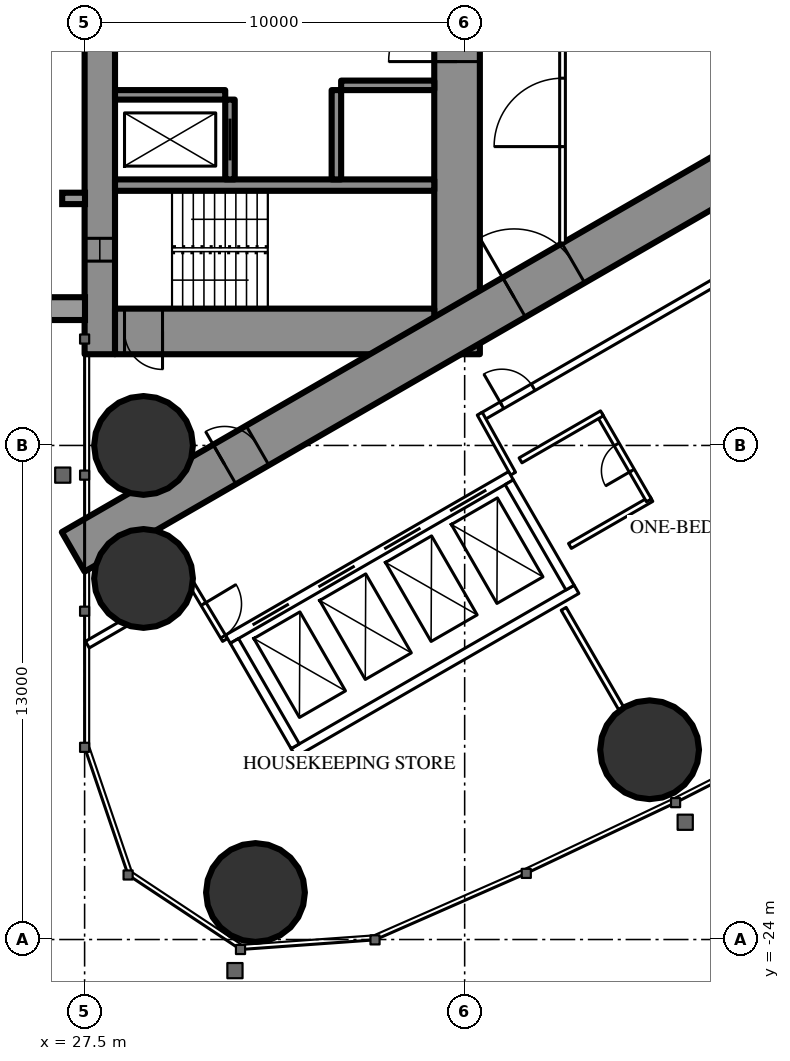
"""IFC4 building model, lengths in metres.
Left out: names, types, materials, properties, quantities, classifications, styles, units other than length and angle.
Written with IfcOpenShell. Run it as: python <this file> out.ifc"""

import sys

from ifc_helpers import new_model, si_unit, direction, frame, frame_2d, origin, origin_2d, place, context, subcontext, project, spatial, rectangle, hollow_circle, extrude, element, fill, save


model = new_model("IFC4")
c1 = context("Model", 3, precision=1e-05, world=origin(), true_north=direction((0.0, 1.0)))
c2 = subcontext(c1, "Body", "Model", "MODEL_VIEW")
j1 = project(units=[si_unit("LENGTHUNIT", "METRE"), si_unit("PLANEANGLEUNIT", "RADIAN")], contexts=[c1])
p1 = place(None, origin())
s1 = spatial("IfcSite", under=j1, at=p1, CompositionType="ELEMENT")
p2 = place(p1, origin())
s2 = spatial("IfcBuilding", under=s1, at=p2, CompositionType="ELEMENT")
p3 = place(p2, frame((0.0, 0.0, 139.6)))
s3 = spatial("IfcBuildingStorey", under=s2, at=p3, CompositionType="ELEMENT", Elevation=139.6)
for number, where, z_axis, x_axis in (
    (1, (31.996, -22.763, 0.0), (0.0, 0.0, 1.0), (1.0, 0.0, 0.0)),
    (2, (29.05, -11.0, 0.0), (0.0, 0.0, 1.0), (1.0, 0.0, 0.0)),
    (3, (29.05, -14.5, 0.0), (0.0, 0.0, 1.0), (1.0, 0.0, 0.0)),
    (4, (42.366, -19.007, 0.0), (0.0, 0.0, 1.0), (1.0, 0.0, 0.0)),
):
    element("IfcColumn", number, at=place(p3, frame(where, z_axis=z_axis, x_axis=x_axis)), inside=s3, PredefinedType="COLUMN", context=c2, shape_type="SweptSolid", body=[
        extrude(hollow_circle(Radius=1.3, WallThickness=0.1, at=origin_2d()), origin(), (0.0, 0.0, 1.0), 3.5),
    ])
p4 = place(p3, frame((27.9, -8.6, 0.0), z_axis=(0.0, 0.0, 1.0), x_axis=(0.0, 1.0, 0.0)))
e5 = element("IfcWall", 5, at=p4, inside=s3, PredefinedType="SHEAR", context=c2, shape_type="SweptSolid", body=[
    extrude(rectangle(XDim=17.2, YDim=0.8, at=frame_2d((8.6, 0.0))), origin(), (0.0, 0.0, 1.0), 3.5),
])
p5 = place(p4, frame((2.45, 0.0, 0.6)))
e6 = element("IfcOpeningElement", 6, at=p5, cuts=e5, PredefinedType="OPENING", context=c2, shape_type="SweptSolid", body=[
    extrude(rectangle(XDim=0.6, YDim=2.1, at=frame_2d((0.3, 1.05))), frame((0.0, 0.41, 0.0), z_axis=(0.0, -1.0, 0.0), x_axis=(1.0, 0.0, 0.0)), (0.0, 0.0, 1.0), 0.82),
])
p6 = place(p4, frame((14.15, 0.0, 0.6)))
e7 = element("IfcOpeningElement", 7, at=p6, cuts=e5, PredefinedType="OPENING", context=c2, shape_type="SweptSolid", body=[
    extrude(rectangle(XDim=0.6, YDim=2.1, at=frame_2d((0.3, 1.05))), frame((0.0, 0.41, 0.0), z_axis=(0.0, -1.0, 0.0), x_axis=(1.0, 0.0, 0.0)), (0.0, 0.0, 1.0), 0.82),
])
p7 = place(p3, frame((37.3, -8.6, 0.0), z_axis=(0.0, 0.0, 1.0), x_axis=(0.0, 1.0, 0.0)))
e8 = element("IfcWall", 8, at=p7, inside=s3, PredefinedType="SHEAR", context=c2, shape_type="SweptSolid", body=[
    extrude(rectangle(XDim=17.2, YDim=1.2, at=frame_2d((8.6, 0.0))), origin(), (0.0, 0.0, 1.0), 3.5),
])
p8 = place(p7, frame((7.7, 0.0, 0.0)))
e9 = element("IfcOpeningElement", 9, at=p8, cuts=e8, PredefinedType="OPENING", context=c2, shape_type="SweptSolid", body=[
    extrude(rectangle(XDim=1.8, YDim=2.2, at=frame_2d((0.9, 1.1))), frame((0.0, 0.61, 0.0), z_axis=(0.0, -1.0, 0.0), x_axis=(1.0, 0.0, 0.0)), (0.0, 0.0, 1.0), 1.22),
])
p9 = place(p3, frame((28.3, -8.0, 0.0), z_axis=(0.0, 0.0, 1.0), x_axis=(1.0, 0.0, 0.0)))
e10 = element("IfcWall", 10, at=p9, inside=s3, PredefinedType="SHEAR", context=c2, shape_type="SweptSolid", body=[
    extrude(rectangle(XDim=8.4, YDim=1.2, at=frame_2d((4.2, 0.0))), origin(), (0.0, 0.0, 1.0), 3.5),
])
p10 = place(p9, frame((0.25, 0.0, 0.0)))
e11 = element("IfcOpeningElement", 11, at=p10, cuts=e10, PredefinedType="OPENING", context=c2, shape_type="SweptSolid", body=[
    extrude(rectangle(XDim=1.0, YDim=2.2, at=frame_2d((0.5, 1.1))), frame((0.0, 0.61, 0.0), z_axis=(0.0, -1.0, 0.0), x_axis=(1.0, 0.0, 0.0)), (0.0, 0.0, 1.0), 1.22),
])
p11 = place(p3, frame((28.3, -4.15, 0.0), z_axis=(0.0, 0.0, 1.0), x_axis=(1.0, 0.0, 0.0)))
e12 = element("IfcWall", 12, at=p11, inside=s3, PredefinedType="SHEAR", context=c2, shape_type="SweptSolid", body=[
    extrude(rectangle(XDim=8.4, YDim=0.3, at=frame_2d((4.2, 0.0))), origin(), (0.0, 0.0, 1.0), 3.5),
])
p12 = place(p3, frame((31.325, -4.0, 0.0), z_axis=(0.0, 0.0, 1.0), x_axis=(0.0, 1.0, 0.0)))
e13 = element("IfcWall", 13, at=p12, inside=s3, PredefinedType="SHEAR", context=c2, shape_type="SweptSolid", body=[
    extrude(rectangle(XDim=2.1, YDim=0.25, at=frame_2d((1.05, 0.0))), origin(), (0.0, 0.0, 1.0), 3.5),
])
p13 = place(p12, frame((0.5, 0.0, 0.0)))
e14 = element("IfcOpeningElement", 14, at=p13, cuts=e13, PredefinedType="OPENING", context=c2, shape_type="SweptSolid", body=[
    extrude(rectangle(XDim=1.1, YDim=2.2, at=frame_2d((0.55, 1.1))), frame((0.0, 0.135, 0.0), z_axis=(0.0, -1.0, 0.0), x_axis=(1.0, 0.0, 0.0)), (0.0, 0.0, 1.0), 0.27),
])
p14 = place(p3, frame((34.125, -4.0, 0.0), z_axis=(0.0, 0.0, 1.0), x_axis=(0.0, 1.0, 0.0)))
e15 = element("IfcWall", 15, at=p14, inside=s3, PredefinedType="SHEAR", context=c2, shape_type="SweptSolid", body=[
    extrude(rectangle(XDim=2.35, YDim=0.25, at=frame_2d((1.175, 0.0))), origin(), (0.0, 0.0, 1.0), 3.5),
])
p15 = place(p3, frame((28.3, -1.775, 0.0), z_axis=(0.0, 0.0, 1.0), x_axis=(1.0, 0.0, 0.0)))
e16 = element("IfcWall", 16, at=p15, inside=s3, PredefinedType="SHEAR", context=c2, shape_type="SweptSolid", body=[
    extrude(rectangle(XDim=2.9, YDim=0.25, at=frame_2d((1.45, 0.0))), origin(), (0.0, 0.0, 1.0), 3.5),
])
p16 = place(p3, frame((34.25, -1.525, 0.0), z_axis=(0.0, 0.0, 1.0), x_axis=(1.0, 0.0, 0.0)))
e17 = element("IfcWall", 17, at=p16, inside=s3, PredefinedType="SHEAR", context=c2, shape_type="SweptSolid", body=[
    extrude(rectangle(XDim=2.45, YDim=0.25, at=frame_2d((1.225, 0.0))), origin(), (0.0, 0.0, 1.0), 3.5),
])
p17 = place(p3, frame((27.2, -13.8, 0.0), z_axis=(0.0, 0.0, 1.0), x_axis=(0.866027159892, 0.499996958321, 0.0)))
e18 = element("IfcWall", 18, at=p17, inside=s3, PredefinedType="SHEAR", context=c2, shape_type="SweptSolid", body=[
    extrude(rectangle(XDim=27.947, YDim=1.2, at=frame_2d((13.973, 0.0))), origin(), (0.0, 0.0, 1.0), 3.5),
])
p18 = place(p17, frame((4.6, 0.0, 0.0)))
e19 = element("IfcOpeningElement", 19, at=p18, cuts=e18, PredefinedType="OPENING", context=c2, shape_type="SweptSolid", body=[
    extrude(rectangle(XDim=1.0, YDim=2.2, at=frame_2d((0.5, 1.1))), frame((0.0, 0.61, 0.0), z_axis=(0.0, -1.0, 0.0), x_axis=(1.0, 0.0, 0.0)), (0.0, 0.0, 1.0), 1.22),
])
p19 = place(p17, frame((13.395, 0.0, 0.0)))
e20 = element("IfcOpeningElement", 20, at=p19, cuts=e18, PredefinedType="OPENING", context=c2, shape_type="SweptSolid", body=[
    extrude(rectangle(XDim=1.8, YDim=2.2, at=frame_2d((0.9, 1.1))), frame((0.0, 0.61, 0.0), z_axis=(0.0, -1.0, 0.0), x_axis=(1.0, 0.0, 0.0)), (0.0, 0.0, 1.0), 1.22),
])
p20 = place(p3, frame((40.105, -15.299, 0.0), z_axis=(0.0, 0.0, 1.0), x_axis=(0.499978822259, -0.866037630414, 0.0)))
e21 = element("IfcWall", 21, at=p20, inside=s3, PredefinedType="PARTITIONING", context=c2, shape_type="SweptSolid", body=[
    extrude(rectangle(XDim=3.023, YDim=0.15, at=frame_2d((1.511, 0.0))), origin(), (0.0, 0.0, 1.0), 3.25),
])
p21 = place(p3, frame((27.572, -16.241, 0.0), z_axis=(0.0, 0.0, 1.0), x_axis=(0.866029654818, 0.499992636921, 0.0)))
e22 = element("IfcWall", 22, at=p21, inside=s3, PredefinedType="PARTITIONING", context=c2, shape_type="SweptSolid", body=[
    extrude(rectangle(XDim=3.155, YDim=0.2, at=frame_2d((1.577, 0.0))), origin(), (0.0, 0.0, 1.0), 3.25),
])
p22 = place(p3, frame((37.96, -10.243, 0.0), z_axis=(0.0, 0.0, 1.0), x_axis=(0.866026429433, 0.499998223521, 0.0)))
e23 = element("IfcWall", 23, at=p22, inside=s3, PredefinedType="PARTITIONING", context=c2, shape_type="SweptSolid", body=[
    extrude(rectangle(XDim=20.487, YDim=0.2, at=frame_2d((10.243, 0.0))), origin(), (0.0, 0.0, 1.0), 3.25),
])
p23 = place(p22, frame((10.743, 0.0, 0.0)))
e24 = element("IfcOpeningElement", 24, at=p23, cuts=e23, PredefinedType="OPENING", context=c2, shape_type="SweptSolid", body=[
    extrude(rectangle(XDim=0.95, YDim=2.2, at=frame_2d((0.475, 1.1))), frame((0.0, 0.11, 0.0), z_axis=(0.0, -1.0, 0.0), x_axis=(1.0, 0.0, 0.0)), (0.0, 0.0, 1.0), 0.22),
])
p24 = place(p22, frame((17.586, 0.0, 0.0)))
e25 = element("IfcOpeningElement", 25, at=p24, cuts=e23, PredefinedType="OPENING", context=c2, shape_type="SweptSolid", body=[
    extrude(rectangle(XDim=1.8, YDim=2.2, at=frame_2d((0.9, 1.1))), frame((0.0, 0.11, 0.0), z_axis=(0.0, -1.0, 0.0), x_axis=(1.0, 0.0, 0.0)), (0.0, 0.0, 1.0), 0.22),
])
p25 = place(p22, frame((0.6, 0.0, 0.0)))
e26 = element("IfcOpeningElement", 26, at=p25, cuts=e23, PredefinedType="OPENING", context=c2, shape_type="SweptSolid", body=[
    extrude(rectangle(XDim=0.95, YDim=2.2, at=frame_2d((0.475, 1.1))), frame((0.0, 0.11, 0.0), z_axis=(0.0, -1.0, 0.0), x_axis=(1.0, 0.0, 0.0)), (0.0, 0.0, 1.0), 0.22),
])
p26 = place(p3, frame((38.773, -11.742, 0.0), z_axis=(0.0, 0.0, 1.0), x_axis=(-0.485528096672, 0.8742210632, 0.0)))
e27 = element("IfcWall", 27, at=p26, inside=s3, PredefinedType="PARTITIONING", context=c2, shape_type="SweptSolid", body=[
    extrude(rectangle(XDim=1.805, YDim=0.15, at=frame_2d((0.903, 0.0))), origin(), (0.0, 0.0, 1.0), 3.25),
])
p27 = place(p3, frame((30.267, -14.569, 0.0), z_axis=(0.0, 0.0, 1.0), x_axis=(0.514336634837, -0.857588377991, 0.0)))
e28 = element("IfcWall", 28, at=p27, inside=s3, PredefinedType="PARTITIONING", context=c2, shape_type="SweptSolid", body=[
    extrude(rectangle(XDim=1.805, YDim=0.15, at=frame_2d((0.903, 0.0))), origin(), (0.0, 0.0, 1.0), 3.25),
])
p28 = place(p27, frame((0.703, 0.0, 0.0)))
e29 = element("IfcOpeningElement", 29, at=p28, cuts=e28, PredefinedType="OPENING", context=c2, shape_type="SweptSolid", body=[
    extrude(rectangle(XDim=1.0, YDim=2.2, at=frame_2d((0.5, 1.1))), frame((0.0, 0.085, 0.0), z_axis=(0.0, -1.0, 0.0), x_axis=(1.0, 0.0, 0.0)), (0.0, 0.0, 1.0), 0.17),
])
p29 = place(p3, frame((40.27, -13.644, 0.0), z_axis=(0.0, 0.0, 1.0), x_axis=(0.866031185235, 0.4999899861, 0.0)))
e30 = element("IfcWall", 30, at=p29, inside=s3, PredefinedType="PARTITIONING", context=c2, shape_type="SweptSolid", body=[
    extrude(rectangle(XDim=2.475, YDim=0.15, at=frame_2d((1.238, 0.0))), origin(), (0.0, 0.0, 1.0), 3.25),
])
p30 = place(p3, frame((41.048, -10.193, 0.0), z_axis=(0.0, 0.0, 1.0), x_axis=(0.500047596559, -0.865997922154, 0.0)))
e31 = element("IfcWall", 31, at=p30, inside=s3, PredefinedType="PARTITIONING", context=c2, shape_type="SweptSolid", body=[
    extrude(rectangle(XDim=2.6, YDim=0.15, at=frame_2d((1.3, 0.0))), origin(), (0.0, 0.0, 1.0), 3.25),
])
p31 = place(p30, frame((0.9, 0.0, 0.0)))
e32 = element("IfcOpeningElement", 32, at=p31, cuts=e31, PredefinedType="OPENING", context=c2, shape_type="SweptSolid", body=[
    extrude(rectangle(XDim=0.8, YDim=2.2, at=frame_2d((0.4, 1.1))), frame((0.0, 0.085, 0.0), z_axis=(0.0, -1.0, 0.0), x_axis=(1.0, 0.0, 0.0)), (0.0, 0.0, 1.0), 0.17),
])
p32 = place(p3, frame((38.97, -11.393, 0.0), z_axis=(0.0, 0.0, 1.0), x_axis=(0.866031185235, 0.4999899861, 0.0)))
e33 = element("IfcWall", 33, at=p32, inside=s3, PredefinedType="PARTITIONING", context=c2, shape_type="SweptSolid", body=[
    extrude(rectangle(XDim=2.475, YDim=0.15, at=frame_2d((1.238, 0.0))), origin(), (0.0, 0.0, 1.0), 3.25),
])
p33 = place(p3, frame((40.075, -5.674, 0.0), z_axis=(0.0, 0.0, 1.0), x_axis=(0.0, 1.0, 0.0)))
e34 = element("IfcWall", 34, at=p33, inside=s3, PredefinedType="PARTITIONING", context=c2, shape_type="SweptSolid", body=[
    extrude(rectangle(XDim=6.874, YDim=0.15, at=frame_2d((3.437, 0.0))), origin(), (0.0, 0.0, 1.0), 3.25),
])
p34 = place(p33, frame((2.537, 0.0, 0.0)))
e35 = element("IfcOpeningElement", 35, at=p34, cuts=e34, PredefinedType="OPENING", context=c2, shape_type="SweptSolid", body=[
    extrude(rectangle(XDim=1.8, YDim=2.2, at=frame_2d((0.9, 1.1))), frame((0.0, 0.085, 0.0), z_axis=(0.0, -1.0, 0.0), x_axis=(1.0, 0.0, 0.0)), (0.0, 0.0, 1.0), 0.17),
])
p35 = place(p3, frame((31.271, -16.097, 0.0), z_axis=(0.0, 0.0, 1.0), x_axis=(0.86604045752, 0.499973925258, 0.0)))
e36 = element("IfcWall", 36, at=p35, inside=s3, PredefinedType="PARTITIONING", context=c2, shape_type="SweptSolid", body=[
    extrude(rectangle(XDim=8.6, YDim=0.25, at=frame_2d((4.3, 0.0))), origin(), (0.0, 0.0, 1.0), 3.25),
])
p36 = place(p35, frame((0.75, 0.0, 0.0)))
e37 = element("IfcOpeningElement", 37, at=p36, cuts=e36, PredefinedType="OPENING", context=c2, shape_type="SweptSolid", body=[
    extrude(rectangle(XDim=1.1, YDim=2.2, at=frame_2d((0.55, 1.1))), frame((0.0, 0.135, 0.0), z_axis=(0.0, -1.0, 0.0), x_axis=(1.0, 0.0, 0.0)), (0.0, 0.0, 1.0), 0.27),
])
p37 = place(p35, frame((2.75, 0.0, 0.0)))
e38 = element("IfcOpeningElement", 38, at=p37, cuts=e36, PredefinedType="OPENING", context=c2, shape_type="SweptSolid", body=[
    extrude(rectangle(XDim=1.1, YDim=2.2, at=frame_2d((0.55, 1.1))), frame((0.0, 0.135, 0.0), z_axis=(0.0, -1.0, 0.0), x_axis=(1.0, 0.0, 0.0)), (0.0, 0.0, 1.0), 0.27),
])
p38 = place(p35, frame((4.75, 0.0, 0.0)))
e39 = element("IfcOpeningElement", 39, at=p38, cuts=e36, PredefinedType="OPENING", context=c2, shape_type="SweptSolid", body=[
    extrude(rectangle(XDim=1.1, YDim=2.2, at=frame_2d((0.55, 1.1))), frame((0.0, 0.135, 0.0), z_axis=(0.0, -1.0, 0.0), x_axis=(1.0, 0.0, 0.0)), (0.0, 0.0, 1.0), 0.27),
])
p39 = place(p35, frame((6.75, 0.0, 0.0)))
e40 = element("IfcOpeningElement", 40, at=p39, cuts=e36, PredefinedType="OPENING", context=c2, shape_type="SweptSolid", body=[
    extrude(rectangle(XDim=1.1, YDim=2.2, at=frame_2d((0.55, 1.1))), frame((0.0, 0.135, 0.0), z_axis=(0.0, -1.0, 0.0), x_axis=(1.0, 0.0, 0.0)), (0.0, 0.0, 1.0), 0.27),
])
p40 = place(p3, frame((32.996, -19.086, 0.0), z_axis=(0.0, 0.0, 1.0), x_axis=(0.866028165386, 0.499995216735, 0.0)))
e41 = element("IfcWall", 41, at=p40, inside=s3, PredefinedType="PARTITIONING", context=c2, shape_type="SweptSolid", body=[
    extrude(rectangle(XDim=8.6, YDim=0.25, at=frame_2d((4.3, 0.0))), origin(), (0.0, 0.0, 1.0), 3.25),
])
for number, where, z_axis, x_axis in (
    (42, (31.441, -16.143, 0.0), (0.0, 0.0, 1.0), (0.5, -0.866, 0.0)),
    (43, (38.673, -11.968, 0.0), (0.0, 0.0, 1.0), (0.5, -0.866, 0.0)),
):
    element("IfcWall", number, at=place(p3, frame(where, z_axis=z_axis, x_axis=x_axis)), inside=s3, PredefinedType="PARTITIONING", context=c2, shape_type="SweptSolid", body=[
        extrude(rectangle(XDim=3.201, YDim=0.25, at=frame_2d((1.6, 0.0))), origin(), (0.0, 0.0, 1.0), 3.25),
    ])
p41 = place(p31, origin())
e44 = element("IfcDoor", 44, at=p41, inside=s3, OperationType="SINGLE_SWING_RIGHT", PredefinedType="DOOR", context=c2, shape_type="SweptSolid", body=[
    extrude(rectangle(XDim=0.8, YDim=2.2, at=frame_2d((0.4, 1.1))), frame((0.0, 0.025, 0.0), z_axis=(0.0, -1.0, 0.0), x_axis=(1.0, 0.0, 0.0)), (0.0, 0.0, 1.0), 0.05),
])
fill(e32, e44)
p42 = place(p25, origin())
e45 = element("IfcDoor", 45, at=p42, inside=s3, OperationType="SINGLE_SWING_LEFT", PredefinedType="DOOR", context=c2, shape_type="SweptSolid", body=[
    extrude(rectangle(XDim=0.95, YDim=2.2, at=frame_2d((0.475, 1.1))), frame((0.0, 0.025, 0.0), z_axis=(0.0, -1.0, 0.0), x_axis=(1.0, 0.0, 0.0)), (0.0, 0.0, 1.0), 0.05),
])
fill(e26, e45)
p43 = place(p28, origin())
e46 = element("IfcDoor", 46, at=p43, inside=s3, OperationType="SINGLE_SWING_LEFT", PredefinedType="DOOR", context=c2, shape_type="SweptSolid", body=[
    extrude(rectangle(XDim=1.0, YDim=2.2, at=frame_2d((0.5, 1.1))), frame((0.0, 0.025, 0.0), z_axis=(0.0, -1.0, 0.0), x_axis=(1.0, 0.0, 0.0)), (0.0, 0.0, 1.0), 0.05),
])
fill(e29, e46)
p44 = place(p34, origin())
e47 = element("IfcDoor", 47, at=p44, inside=s3, OperationType="DOUBLE_DOOR_SINGLE_SWING", PredefinedType="DOOR", context=c2, shape_type="SweptSolid", body=[
    extrude(rectangle(XDim=1.8, YDim=2.2, at=frame_2d((0.9, 1.1))), frame((0.0, 0.025, 0.0), z_axis=(0.0, -1.0, 0.0), x_axis=(1.0, 0.0, 0.0)), (0.0, 0.0, 1.0), 0.05),
])
fill(e35, e47)
p45 = place(p18, origin())
e48 = element("IfcDoor", 48, at=p45, inside=s3, OperationType="SINGLE_SWING_LEFT", PredefinedType="DOOR", context=c2, shape_type="SweptSolid", body=[
    extrude(rectangle(XDim=1.0, YDim=2.2, at=frame_2d((0.5, 1.1))), frame((0.0, 0.025, 0.0), z_axis=(0.0, -1.0, 0.0), x_axis=(1.0, 0.0, 0.0)), (0.0, 0.0, 1.0), 0.05),
])
fill(e19, e48)
p46 = place(p19, origin())
e49 = element("IfcDoor", 49, at=p46, inside=s3, OperationType="DOUBLE_DOOR_SINGLE_SWING", PredefinedType="DOOR", context=c2, shape_type="SweptSolid", body=[
    extrude(rectangle(XDim=1.8, YDim=2.2, at=frame_2d((0.9, 1.1))), frame((0.0, 0.025, 0.0), z_axis=(0.0, -1.0, 0.0), x_axis=(1.0, 0.0, 0.0)), (0.0, 0.0, 1.0), 0.05),
])
fill(e20, e49)
p47 = place(p8, origin())
e50 = element("IfcDoor", 50, at=p47, inside=s3, OperationType="DOUBLE_DOOR_SINGLE_SWING", PredefinedType="DOOR", context=c2, shape_type="SweptSolid", body=[
    extrude(rectangle(XDim=1.8, YDim=2.2, at=frame_2d((0.9, 1.1))), frame((0.0, 0.025, 0.0), z_axis=(0.0, -1.0, 0.0), x_axis=(1.0, 0.0, 0.0)), (0.0, 0.0, 1.0), 0.05),
])
fill(e9, e50)
p48 = place(p10, origin())
e51 = element("IfcDoor", 51, at=p48, inside=s3, OperationType="SINGLE_SWING_RIGHT", PredefinedType="DOOR", context=c2, shape_type="SweptSolid", body=[
    extrude(rectangle(XDim=1.0, YDim=2.2, at=frame_2d((0.5, 1.1))), frame((0.0, 0.025, 0.0), z_axis=(0.0, -1.0, 0.0), x_axis=(1.0, 0.0, 0.0)), (0.0, 0.0, 1.0), 0.05),
])
fill(e11, e51)
p49 = place(p13, origin())
e52 = element("IfcDoor", 52, at=p49, inside=s3, OperationType="SLIDING_TO_LEFT", PredefinedType="USERDEFINED", context=c2, shape_type="SweptSolid", body=[
    extrude(rectangle(XDim=1.1, YDim=2.2, at=frame_2d((0.55, 1.1))), frame((0.0, 0.025, 0.0), z_axis=(0.0, -1.0, 0.0), x_axis=(1.0, 0.0, 0.0)), (0.0, 0.0, 1.0), 0.05),
])
fill(e14, e52)
p50 = place(p36, origin())
e53 = element("IfcDoor", 53, at=p50, inside=s3, OperationType="DOUBLE_DOOR_SLIDING", PredefinedType="USERDEFINED", context=c2, shape_type="SweptSolid", body=[
    extrude(rectangle(XDim=1.1, YDim=2.2, at=frame_2d((0.55, 1.1))), frame((0.0, 0.025, 0.0), z_axis=(0.0, -1.0, 0.0), x_axis=(1.0, 0.0, 0.0)), (0.0, 0.0, 1.0), 0.05),
])
fill(e37, e53)
p51 = place(p37, origin())
e54 = element("IfcDoor", 54, at=p51, inside=s3, OperationType="DOUBLE_DOOR_SLIDING", PredefinedType="USERDEFINED", context=c2, shape_type="SweptSolid", body=[
    extrude(rectangle(XDim=1.1, YDim=2.2, at=frame_2d((0.55, 1.1))), frame((0.0, 0.025, 0.0), z_axis=(0.0, -1.0, 0.0), x_axis=(1.0, 0.0, 0.0)), (0.0, 0.0, 1.0), 0.05),
])
fill(e38, e54)
p52 = place(p38, origin())
e55 = element("IfcDoor", 55, at=p52, inside=s3, OperationType="DOUBLE_DOOR_SLIDING", PredefinedType="USERDEFINED", context=c2, shape_type="SweptSolid", body=[
    extrude(rectangle(XDim=1.1, YDim=2.2, at=frame_2d((0.55, 1.1))), frame((0.0, 0.025, 0.0), z_axis=(0.0, -1.0, 0.0), x_axis=(1.0, 0.0, 0.0)), (0.0, 0.0, 1.0), 0.05),
])
fill(e39, e55)
p53 = place(p39, origin())
e56 = element("IfcDoor", 56, at=p53, inside=s3, OperationType="DOUBLE_DOOR_SLIDING", PredefinedType="USERDEFINED", context=c2, shape_type="SweptSolid", body=[
    extrude(rectangle(XDim=1.1, YDim=2.2, at=frame_2d((0.55, 1.1))), frame((0.0, 0.025, 0.0), z_axis=(0.0, -1.0, 0.0), x_axis=(1.0, 0.0, 0.0)), (0.0, 0.0, 1.0), 0.05),
])
fill(e40, e56)
p54 = place(p5, origin())
e57 = element("IfcWindow", 57, at=p54, inside=s3, PartitioningType="SINGLE_PANEL", PredefinedType="WINDOW", context=c2, shape_type="SweptSolid", body=[
    extrude(rectangle(XDim=0.6, YDim=2.1, at=frame_2d((0.3, 1.05))), frame((0.0, 0.03, 0.0), z_axis=(0.0, -1.0, 0.0), x_axis=(1.0, 0.0, 0.0)), (0.0, 0.0, 1.0), 0.06),
])
fill(e6, e57)
save(model, sys.argv[1])
